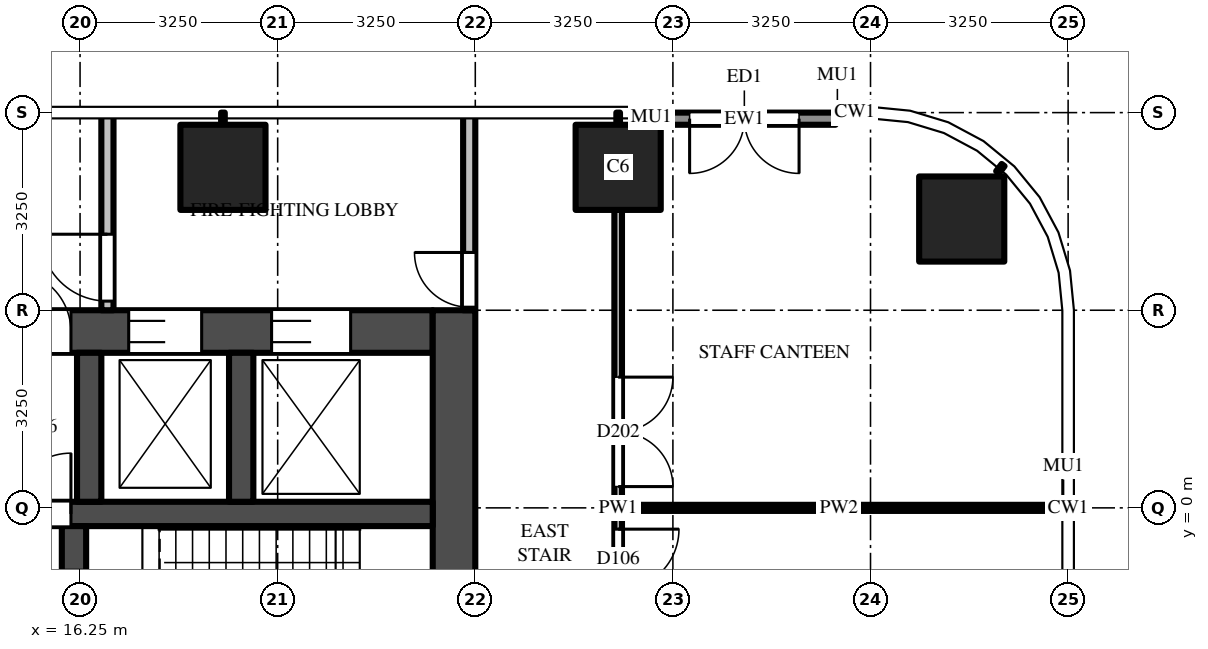
"""IFC4 building model, lengths in metres.
Left out: names, types, materials, properties, quantities, classifications, styles, units other than length and angle.
Written with IfcOpenShell. Run it as: python <this file> out.ifc"""

import sys

from ifc_helpers import new_model, si_unit, direction, frame, frame_2d, origin, origin_2d, place, context, subcontext, project, spatial, rectangle, extrude, source, transform, mapped, element, fill, save


model = new_model("IFC4")
c1 = context("Model", 3, precision=1e-05, world=origin(), true_north=direction((0.0, 1.0)))
c2 = subcontext(c1, "Body", "Model", "MODEL_VIEW")
j1 = project(units=[si_unit("LENGTHUNIT", "METRE"), si_unit("PLANEANGLEUNIT", "RADIAN")], contexts=[c1])
p1 = place(None, origin())
s1 = spatial("IfcSite", under=j1, at=p1, CompositionType="ELEMENT")
p2 = place(p1, origin())
s2 = spatial("IfcBuilding", under=s1, at=p2, CompositionType="ELEMENT")
p3 = place(p2, frame((0.0, 0.0, 88.0)))
s3 = spatial("IfcBuildingStorey", under=s2, at=p3, CompositionType="ELEMENT", Elevation=88.0)
m1 = source(origin(), c2, "Body", "SweptSolid", [
    extrude(rectangle(XDim=1.4, YDim=1.4, at=origin_2d()), origin(), (0.0, 0.0, 1.0), 4.5),
])
for number, where, z_axis, x_axis in (
    (1, (18.6, 5.6, 0.0), (0.0, 0.0, 1.0), (1.0, 0.0, 0.0)),
    (2, (25.1, 5.6, 0.0), (0.0, 0.0, 1.0), (1.0, 0.0, 0.0)),
    (3, (30.75, 4.75, 0.0), (0.0, 0.0, 1.0), (1.0, 0.0, 0.0)),
):
    element("IfcColumn", number, at=place(p3, frame(where, z_axis=z_axis, x_axis=x_axis)), inside=s3, PredefinedType="COLUMN", context=c2, shape_type="MappedRepresentation", body=[
        mapped(m1, transform((0.0, 0.0, 0.0))),
    ])
m2 = source(origin(), c2, "Body", "SweptSolid", [
    extrude(rectangle(XDim=14.85, YDim=0.7, at=frame_2d((7.425, 0.0))), origin(), (0.0, 0.0, 1.0), 4.2),
])
p4 = place(p3, frame((7.2, 2.9, 0.0), z_axis=(0.0, 0.0, 1.0), x_axis=(1.0, 0.0, 0.0)))
e4 = element("IfcWall", 4, at=p4, inside=s3, PredefinedType="SHEAR", context=c2, shape_type="MappedRepresentation", body=[
    mapped(m2, transform((0.0, 0.0, 0.0))),
])
m3 = source(origin(), c2, "Body", "SweptSolid", [
    extrude(rectangle(XDim=1.3, YDim=2.1, at=frame_2d((0.65, 1.05))), frame((0.0, 0.36, 0.0), z_axis=(0.0, -1.0, 0.0), x_axis=(1.0, 0.0, 0.0)), (0.0, 0.0, 1.0), 0.72),
])
p5 = place(p4, frame((12.2, 0.0, 0.0)))
e5 = element("IfcOpeningElement", 5, at=p5, cuts=e4, PredefinedType="OPENING", context=c2, shape_type="MappedRepresentation", body=[
    mapped(m3, transform((0.0, 0.0, 0.0))),
])
m4 = source(origin(), c2, "Body", "SweptSolid", [
    extrude(rectangle(XDim=1.2, YDim=2.1, at=frame_2d((0.6, 1.05))), frame((0.0, 0.36, 0.0), z_axis=(0.0, -1.0, 0.0), x_axis=(1.0, 0.0, 0.0)), (0.0, 0.0, 1.0), 0.72),
])
p6 = place(p4, frame((9.85, 0.0, 0.0)))
e6 = element("IfcOpeningElement", 6, at=p6, cuts=e4, PredefinedType="OPENING", context=c2, shape_type="MappedRepresentation", body=[
    mapped(m4, transform((0.0, 0.0, 0.0))),
])
m5 = source(origin(), c2, "Body", "SweptSolid", [
    extrude(rectangle(XDim=1.0, YDim=2.1, at=frame_2d((0.5, 1.05))), frame((0.0, 0.36, 0.0), z_axis=(0.0, -1.0, 0.0), x_axis=(1.0, 0.0, 0.0)), (0.0, 0.0, 1.0), 0.72),
])
p7 = place(p4, frame((7.9, 0.0, 0.0)))
e7 = element("IfcOpeningElement", 7, at=p7, cuts=e4, PredefinedType="OPENING", context=c2, shape_type="MappedRepresentation", body=[
    mapped(m5, transform((0.0, 0.0, 0.0))),
])
p8 = place(p4, frame((0.6, 0.0, 0.0)))
e8 = element("IfcOpeningElement", 8, at=p8, cuts=e4, PredefinedType="OPENING", context=c2, shape_type="MappedRepresentation", body=[
    mapped(m5, transform((0.0, 0.0, 0.0))),
])
m6 = source(origin(), c2, "Body", "SweptSolid", [
    extrude(rectangle(XDim=0.9, YDim=2.1, at=frame_2d((0.45, 1.05))), frame((0.0, 0.36, 0.0), z_axis=(0.0, -1.0, 0.0), x_axis=(1.0, 0.0, 0.0)), (0.0, 0.0, 1.0), 0.72),
])
p9 = place(p4, frame((3.25, 0.0, 0.0)))
e9 = element("IfcOpeningElement", 9, at=p9, cuts=e4, PredefinedType="OPENING", context=c2, shape_type="MappedRepresentation", body=[
    mapped(m6, transform((0.0, 0.0, 0.0))),
])
p10 = place(p4, frame((5.85, 0.0, 0.0)))
e10 = element("IfcOpeningElement", 10, at=p10, cuts=e4, PredefinedType="OPENING", context=c2, shape_type="MappedRepresentation", body=[
    mapped(m6, transform((0.0, 0.0, 0.0))),
])
m7 = source(origin(), c2, "Body", "SweptSolid", [
    extrude(rectangle(XDim=9.05, YDim=0.7, at=frame_2d((4.525, 0.0))), origin(), (0.0, 0.0, 1.0), 4.2),
])
p11 = place(p3, frame((22.4, -5.8, 0.0), z_axis=(0.0, 0.0, 1.0), x_axis=(0.0, 1.0, 0.0)))
e11 = element("IfcWall", 11, at=p11, inside=s3, PredefinedType="SHEAR", context=c2, shape_type="MappedRepresentation", body=[
    mapped(m7, transform((0.0, 0.0, 0.0))),
])
m8 = source(origin(), c2, "Body", "SweptSolid", [
    extrude(rectangle(XDim=14.85, YDim=0.4, at=frame_2d((7.425, 0.0))), origin(), (0.0, 0.0, 1.0), 4.2),
])
p12 = place(p3, frame((7.2, -0.1, 0.0), z_axis=(0.0, 0.0, 1.0), x_axis=(1.0, 0.0, 0.0)))
e12 = element("IfcWall", 12, at=p12, inside=s3, PredefinedType="SHEAR", context=c2, shape_type="MappedRepresentation", body=[
    mapped(m8, transform((0.0, 0.0, 0.0))),
])
m9 = source(origin(), c2, "Body", "SweptSolid", [
    extrude(rectangle(XDim=1.0, YDim=2.1, at=frame_2d((0.5, 1.05))), frame((0.0, 0.21, 0.0), z_axis=(0.0, -1.0, 0.0), x_axis=(1.0, 0.0, 0.0)), (0.0, 0.0, 1.0), 0.42),
])
p13 = place(p12, frame((7.9, 0.0, 0.0)))
e13 = element("IfcOpeningElement", 13, at=p13, cuts=e12, PredefinedType="OPENING", context=c2, shape_type="MappedRepresentation", body=[
    mapped(m9, transform((0.0, 0.0, 0.0))),
])
m10 = source(origin(), c2, "Body", "SweptSolid", [
    extrude(rectangle(XDim=5.5, YDim=0.4, at=frame_2d((2.75, 0.0))), origin(), (0.0, 0.0, 1.0), 4.2),
])
p14 = place(p3, frame((16.15, -5.8, 0.0), z_axis=(0.0, 0.0, 1.0), x_axis=(0.0, 1.0, 0.0)))
e14 = element("IfcWall", 14, at=p14, inside=s3, PredefinedType="SHEAR", context=c2, shape_type="MappedRepresentation", body=[
    mapped(m10, transform((0.0, 0.0, 0.0))),
])
m11 = source(origin(), c2, "Body", "SweptSolid", [
    extrude(rectangle(XDim=1.1, YDim=2.1, at=frame_2d((0.55, 1.05))), frame((0.0, 0.21, 0.0), z_axis=(0.0, -1.0, 0.0), x_axis=(1.0, 0.0, 0.0)), (0.0, 0.0, 1.0), 0.42),
])
p15 = place(p14, frame((0.725, 0.0, 0.0)))
e15 = element("IfcOpeningElement", 15, at=p15, cuts=e14, PredefinedType="OPENING", context=c2, shape_type="MappedRepresentation", body=[
    mapped(m11, transform((0.0, 0.0, 0.0))),
])
p16 = place(p14, frame((3.675, 0.0, 0.0)))
e16 = element("IfcOpeningElement", 16, at=p16, cuts=e14, PredefinedType="OPENING", context=c2, shape_type="MappedRepresentation", body=[
    mapped(m11, transform((0.0, 0.0, 0.0))),
])
m12 = source(origin(), c2, "Body", "SweptSolid", [
    extrude(rectangle(XDim=2.45, YDim=0.4, at=frame_2d((1.225, 0.0))), origin(), (0.0, 0.0, 1.0), 4.2),
])
for number, where, z_axis, x_axis in (
    (17, (16.4, 0.1, 0.0), (0.0, 0.0, 1.0), (0.0, 1.0, 0.0)),
    (18, (18.9, 0.1, 0.0), (0.0, 0.0, 1.0), (0.0, 1.0, 0.0)),
):
    element("IfcWall", number, at=place(p3, frame(where, z_axis=z_axis, x_axis=x_axis)), inside=s3, PredefinedType="SHEAR", context=c2, shape_type="MappedRepresentation", body=[
        mapped(m12, transform((0.0, 0.0, 0.0))),
    ])
m13 = source(origin(), c2, "Body", "SweptSolid", [
    extrude(rectangle(XDim=3.25, YDim=0.2, at=frame_2d((1.625, 0.0))), origin(), (0.0, 0.0, 1.0), 4.2),
])
p17 = place(p3, frame((16.7, 3.25, 0.0), z_axis=(0.0, 0.0, 1.0), x_axis=(0.0, 1.0, 0.0)))
e19 = element("IfcWall", 19, at=p17, inside=s3, PredefinedType="PARTITIONING", context=c2, shape_type="MappedRepresentation", body=[
    mapped(m13, transform((0.0, 0.0, 0.0))),
])
m14 = source(origin(), c2, "Body", "SweptSolid", [
    extrude(rectangle(XDim=1.1, YDim=2.1, at=frame_2d((0.55, 1.05))), frame((0.0, 0.11, 0.0), z_axis=(0.0, -1.0, 0.0), x_axis=(1.0, 0.0, 0.0)), (0.0, 0.0, 1.0), 0.22),
])
p18 = place(p17, frame((0.15, 0.0, 0.0)))
e20 = element("IfcOpeningElement", 20, at=p18, cuts=e19, PredefinedType="OPENING", context=c2, shape_type="MappedRepresentation", body=[
    mapped(m14, transform((0.0, 0.0, 0.0))),
])
p19 = place(p3, frame((22.65, 3.25, 0.0), z_axis=(0.0, 0.0, 1.0), x_axis=(0.0, 1.0, 0.0)))
e21 = element("IfcWall", 21, at=p19, inside=s3, PredefinedType="PARTITIONING", context=c2, shape_type="MappedRepresentation", body=[
    mapped(m13, transform((0.0, 0.0, 0.0))),
])
m15 = source(origin(), c2, "Body", "SweptSolid", [
    extrude(rectangle(XDim=0.9, YDim=2.1, at=frame_2d((0.45, 1.05))), frame((0.0, 0.11, 0.0), z_axis=(0.0, -1.0, 0.0), x_axis=(1.0, 0.0, 0.0)), (0.0, 0.0, 1.0), 0.22),
])
p20 = place(p19, frame((0.05, 0.0, 0.0)))
e22 = element("IfcOpeningElement", 22, at=p20, cuts=e21, PredefinedType="OPENING", context=c2, shape_type="MappedRepresentation", body=[
    mapped(m15, transform((0.0, 0.0, 0.0))),
])
p21 = place(p3, frame((28.675, 6.4, 0.0), z_axis=(0.0, 0.0, 1.0), x_axis=(-1.0, 0.0, 0.0)))
e23 = element("IfcWall", 23, at=p21, inside=s3, PredefinedType="SOLIDWALL", context=c2, shape_type="SweptSolid", body=[
    extrude(rectangle(XDim=3.0, YDim=0.2, at=frame_2d((1.5, 0.0))), origin(), (0.0, 0.0, 1.0), 4.2),
])
m16 = source(origin(), c2, "Body", "SweptSolid", [
    extrude(rectangle(XDim=1.8, YDim=2.4, at=frame_2d((0.9, 1.2))), frame((0.0, 0.11, 0.0), z_axis=(0.0, -1.0, 0.0), x_axis=(1.0, 0.0, 0.0)), (0.0, 0.0, 1.0), 0.22),
])
p22 = place(p21, frame((0.6, 0.0, 0.0)))
e24 = element("IfcOpeningElement", 24, at=p22, cuts=e23, PredefinedType="OPENING", context=c2, shape_type="MappedRepresentation", body=[
    mapped(m16, transform((0.0, 0.0, 0.0))),
])
m17 = source(origin(), c2, "Body", "SweptSolid", [
    extrude(rectangle(XDim=9.8, YDim=0.125, at=frame_2d((4.9, 0.0))), origin(), (0.0, 0.0, 1.0), 3.418),
])
p23 = place(p3, frame((25.1, 4.9, 0.0), z_axis=(0.0, 0.0, 1.0), x_axis=(0.0, -1.0, 0.0)))
e25 = element("IfcWall", 25, at=p23, inside=s3, PredefinedType="PARTITIONING", context=c2, shape_type="MappedRepresentation", body=[
    mapped(m17, transform((0.0, 0.0, 0.0))),
])
m18 = source(origin(), c2, "Body", "SweptSolid", [
    extrude(rectangle(XDim=1.0, YDim=2.1, at=frame_2d((0.5, 1.05))), frame((0.0, 0.073, 0.0), z_axis=(0.0, -1.0, 0.0), x_axis=(1.0, 0.0, 0.0)), (0.0, 0.0, 1.0), 0.145),
])
p24 = place(p23, frame((5.25, 0.0, 0.0)))
e26 = element("IfcOpeningElement", 26, at=p24, cuts=e25, PredefinedType="OPENING", context=c2, shape_type="MappedRepresentation", body=[
    mapped(m18, transform((0.0, 0.0, 0.0))),
])
m19 = source(origin(), c2, "Body", "SweptSolid", [
    extrude(rectangle(XDim=1.8, YDim=2.1, at=frame_2d((0.9, 1.05))), frame((0.0, 0.073, 0.0), z_axis=(0.0, -1.0, 0.0), x_axis=(1.0, 0.0, 0.0)), (0.0, 0.0, 1.0), 0.145),
])
p25 = place(p23, frame((2.75, 0.0, 0.0)))
e27 = element("IfcOpeningElement", 27, at=p25, cuts=e25, PredefinedType="OPENING", context=c2, shape_type="MappedRepresentation", body=[
    mapped(m19, transform((0.0, 0.0, 0.0))),
])
p26 = place(p3, frame((25.163, 0.0, 0.0), z_axis=(0.0, 0.0, 1.0), x_axis=(1.0, 0.0, 0.0)))
e28 = element("IfcWall", 28, at=p26, inside=s3, PredefinedType="PARTITIONING", context=c2, shape_type="SweptSolid", body=[
    extrude(rectangle(XDim=7.137, YDim=0.1, at=frame_2d((3.569, 0.0))), origin(), (0.0, 0.0, 1.0), 3.28),
])
m20 = source(origin(), c2, "Body", "SweptSolid", [
    extrude(rectangle(XDim=1.3, YDim=2.1, at=frame_2d((0.65, 1.05))), frame((0.0, -0.275, 0.0), z_axis=(0.0, -1.0, 0.0), x_axis=(1.0, 0.0, 0.0)), (0.0, 0.0, 1.0), 0.05),
])
p27 = place(p5, origin())
e29 = element("IfcDoor", 29, at=p27, inside=s3, OperationType="DOUBLE_DOOR_SLIDING", PredefinedType="DOOR", context=c2, shape_type="MappedRepresentation", body=[
    mapped(m20, transform((0.0, 0.0, 0.0))),
])
fill(e5, e29)
m21 = source(origin(), c2, "Body", "SweptSolid", [
    extrude(rectangle(XDim=1.2, YDim=2.1, at=frame_2d((0.6, 1.05))), frame((0.0, -0.275, 0.0), z_axis=(0.0, -1.0, 0.0), x_axis=(1.0, 0.0, 0.0)), (0.0, 0.0, 1.0), 0.05),
])
p28 = place(p6, origin())
e30 = element("IfcDoor", 30, at=p28, inside=s3, OperationType="DOUBLE_DOOR_SLIDING", PredefinedType="DOOR", context=c2, shape_type="MappedRepresentation", body=[
    mapped(m21, transform((0.0, 0.0, 0.0))),
])
fill(e6, e30)
m22 = source(origin(), c2, "Body", "SweptSolid", [
    extrude(rectangle(XDim=1.0, YDim=2.1, at=frame_2d((0.5, 1.05))), frame((0.0, 0.025, 0.0), z_axis=(0.0, -1.0, 0.0), x_axis=(1.0, 0.0, 0.0)), (0.0, 0.0, 1.0), 0.05),
])
p29 = place(p13, origin())
e31 = element("IfcDoor", 31, at=p29, inside=s3, OperationType="SINGLE_SWING_RIGHT", PredefinedType="DOOR", context=c2, shape_type="MappedRepresentation", body=[
    mapped(m22, transform((0.0, 0.0, 0.0))),
])
fill(e13, e31)
m23 = source(origin(), c2, "Body", "SweptSolid", [
    extrude(rectangle(XDim=1.0, YDim=2.1, at=frame_2d((0.5, 1.05))), frame((0.0, -0.275, 0.0), z_axis=(0.0, -1.0, 0.0), x_axis=(1.0, 0.0, 0.0)), (0.0, 0.0, 1.0), 0.05),
])
p30 = place(p7, origin())
e32 = element("IfcDoor", 32, at=p30, inside=s3, OperationType="SINGLE_SWING_LEFT", PredefinedType="DOOR", context=c2, shape_type="MappedRepresentation", body=[
    mapped(m23, transform((0.0, 0.0, 0.0))),
])
fill(e7, e32)
m24 = source(origin(), c2, "Body", "SweptSolid", [
    extrude(rectangle(XDim=1.1, YDim=2.1, at=frame_2d((0.55, 1.05))), frame((0.0, 0.025, 0.0), z_axis=(0.0, -1.0, 0.0), x_axis=(1.0, 0.0, 0.0)), (0.0, 0.0, 1.0), 0.05),
])
p31 = place(p18, origin())
e33 = element("IfcDoor", 33, at=p31, inside=s3, OperationType="SINGLE_SWING_RIGHT", PredefinedType="DOOR", context=c2, shape_type="MappedRepresentation", body=[
    mapped(m24, transform((0.0, 0.0, 0.0))),
])
fill(e20, e33)
m25 = source(origin(), c2, "Body", "SweptSolid", [
    extrude(rectangle(XDim=0.9, YDim=2.1, at=frame_2d((0.45, 1.05))), frame((0.0, 0.025, 0.0), z_axis=(0.0, -1.0, 0.0), x_axis=(1.0, 0.0, 0.0)), (0.0, 0.0, 1.0), 0.05),
])
p32 = place(p20, origin())
e34 = element("IfcDoor", 34, at=p32, inside=s3, OperationType="SINGLE_SWING_RIGHT", PredefinedType="DOOR", context=c2, shape_type="MappedRepresentation", body=[
    mapped(m25, transform((0.0, 0.0, 0.0))),
])
fill(e22, e34)
m26 = source(origin(), c2, "Body", "SweptSolid", [
    extrude(rectangle(XDim=1.8, YDim=2.4, at=frame_2d((0.9, 1.2))), frame((0.0, 0.025, 0.0), z_axis=(0.0, -1.0, 0.0), x_axis=(1.0, 0.0, 0.0)), (0.0, 0.0, 1.0), 0.05),
])
p33 = place(p22, origin())
e35 = element("IfcDoor", 35, at=p33, inside=s3, OperationType="DOUBLE_DOOR_SINGLE_SWING", PredefinedType="DOOR", context=c2, shape_type="MappedRepresentation", body=[
    mapped(m26, transform((0.0, 0.0, 0.0))),
])
fill(e24, e35)
p34 = place(p24, origin())
e36 = element("IfcDoor", 36, at=p34, inside=s3, OperationType="SINGLE_SWING_LEFT", PredefinedType="DOOR", context=c2, shape_type="MappedRepresentation", body=[
    mapped(m22, transform((0.0, 0.0, 0.0))),
])
fill(e26, e36)
m27 = source(origin(), c2, "Body", "SweptSolid", [
    extrude(rectangle(XDim=1.8, YDim=2.1, at=frame_2d((0.9, 1.05))), frame((0.0, 0.025, 0.0), z_axis=(0.0, -1.0, 0.0), x_axis=(1.0, 0.0, 0.0)), (0.0, 0.0, 1.0), 0.05),
])
p35 = place(p25, origin())
e37 = element("IfcDoor", 37, at=p35, inside=s3, OperationType="DOUBLE_DOOR_SINGLE_SWING", PredefinedType="DOOR", context=c2, shape_type="MappedRepresentation", body=[
    mapped(m27, transform((0.0, 0.0, 0.0))),
])
fill(e27, e37)
save(model, sys.argv[1])
